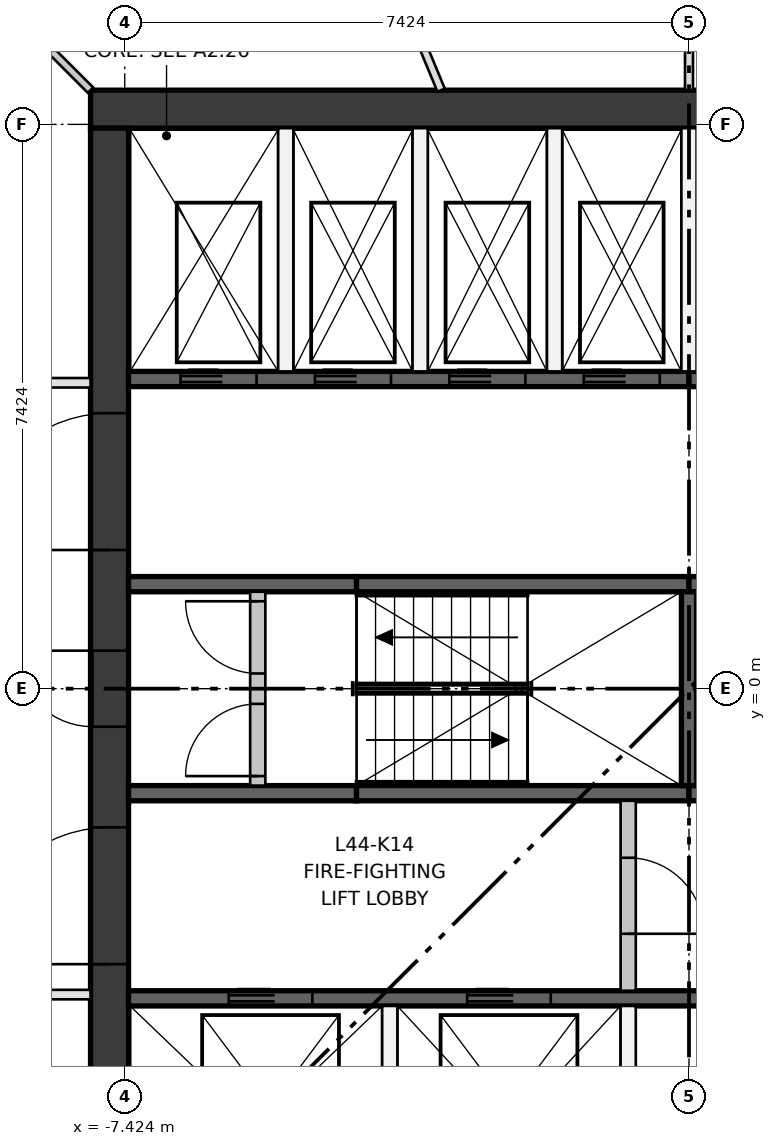
"""IFC4 building model, lengths in metres.
Left out: names, types, materials, properties, quantities, classifications, styles, units other than length and angle.
Written with IfcOpenShell. Run it as: python <this file> out.ifc"""

import sys

from ifc_helpers import new_model, si_unit, direction, frame, frame_2d, origin, place, context, subcontext, project, spatial, rectangle, extrude, element, fill, save


model = new_model("IFC4")
c1 = context("Model", 3, precision=1e-05, world=origin(), true_north=direction((0.0, 1.0)))
c2 = subcontext(c1, "Body", "Model", "MODEL_VIEW")
j1 = project(units=[si_unit("LENGTHUNIT", "METRE"), si_unit("PLANEANGLEUNIT", "RADIAN")], contexts=[c1])
p1 = place(None, origin())
s1 = spatial("IfcSite", under=j1, at=p1, CompositionType="ELEMENT")
p2 = place(p1, origin())
s2 = spatial("IfcBuilding", under=s1, at=p2, CompositionType="ELEMENT")
p3 = place(p2, frame((0.0, 0.0, 167.55)))
s3 = spatial("IfcBuildingStorey", under=s2, at=p3, CompositionType="ELEMENT", Elevation=167.55)
p4 = place(p3, frame((-7.874, 7.624, 0.0), z_axis=(0.0, 0.0, 1.0), x_axis=(1.0, 0.0, 0.0)))
e1 = element("IfcWall", 1, at=p4, inside=s3, PredefinedType="SHEAR", context=c2, shape_type="SweptSolid", body=[
    extrude(rectangle(XDim=15.748, YDim=0.5, at=frame_2d((7.874, 0.0))), origin(), (0.0, 0.0, 1.0), 3.35),
])
p5 = place(p3, frame((-7.624, -7.374, 0.0), z_axis=(0.0, 0.0, 1.0), x_axis=(0.0, 1.0, 0.0)))
e2 = element("IfcWall", 2, at=p5, inside=s3, PredefinedType="SHEAR", context=c2, shape_type="SweptSolid", body=[
    extrude(rectangle(XDim=14.748, YDim=0.5, at=frame_2d((7.374, 0.0))), origin(), (0.0, 0.0, 1.0), 3.35),
])
p6 = place(p5, frame((6.874, 0.0, 0.0)))
e3 = element("IfcOpeningElement", 3, at=p6, cuts=e2, PredefinedType="OPENING", context=c2, shape_type="SweptSolid", body=[
    extrude(rectangle(XDim=1.0, YDim=2.1, at=frame_2d((0.5, 1.05))), frame((0.0, 0.26, 0.0), z_axis=(0.0, -1.0, 0.0), x_axis=(1.0, 0.0, 0.0)), (0.0, 0.0, 1.0), 0.52),
])
p7 = place(p5, frame((3.75, 0.0, 0.0)))
e4 = element("IfcOpeningElement", 4, at=p7, cuts=e2, PredefinedType="OPENING", context=c2, shape_type="SweptSolid", body=[
    extrude(rectangle(XDim=1.8, YDim=2.1, at=frame_2d((0.9, 1.05))), frame((0.0, 0.26, 0.0), z_axis=(0.0, -1.0, 0.0), x_axis=(1.0, 0.0, 0.0)), (0.0, 0.0, 1.0), 0.52),
])
p8 = place(p5, frame((9.198, 0.0, 0.0)))
e5 = element("IfcOpeningElement", 5, at=p8, cuts=e2, PredefinedType="OPENING", context=c2, shape_type="SweptSolid", body=[
    extrude(rectangle(XDim=1.8, YDim=2.1, at=frame_2d((0.9, 1.05))), frame((0.0, 0.26, 0.0), z_axis=(0.0, -1.0, 0.0), x_axis=(1.0, 0.0, 0.0)), (0.0, 0.0, 1.0), 0.52),
])
p9 = place(p3, frame((-7.374, -4.074, 0.0), z_axis=(0.0, 0.0, 1.0), x_axis=(1.0, 0.0, 0.0)))
e6 = element("IfcWall", 6, at=p9, inside=s3, PredefinedType="SHEAR", context=c2, shape_type="SweptSolid", body=[
    extrude(rectangle(XDim=14.748, YDim=0.2, at=frame_2d((7.374, 0.0))), origin(), (0.0, 0.0, 1.0), 3.0),
])
p10 = place(p9, frame((1.319, 0.0, 0.0)))
e7 = element("IfcOpeningElement", 7, at=p10, cuts=e6, PredefinedType="OPENING", context=c2, shape_type="SweptSolid", body=[
    extrude(rectangle(XDim=1.1, YDim=2.1, at=frame_2d((0.55, 1.05))), frame((0.0, 0.11, 0.0), z_axis=(0.0, -1.0, 0.0), x_axis=(1.0, 0.0, 0.0)), (0.0, 0.0, 1.0), 0.22),
])
p11 = place(p9, frame((4.456, 0.0, 0.0)))
e8 = element("IfcOpeningElement", 8, at=p11, cuts=e6, PredefinedType="OPENING", context=c2, shape_type="SweptSolid", body=[
    extrude(rectangle(XDim=1.1, YDim=2.1, at=frame_2d((0.55, 1.05))), frame((0.0, 0.11, 0.0), z_axis=(0.0, -1.0, 0.0), x_axis=(1.0, 0.0, 0.0)), (0.0, 0.0, 1.0), 0.22),
])
p12 = place(p9, frame((7.551, 0.0, 0.0)))
e9 = element("IfcOpeningElement", 9, at=p12, cuts=e6, PredefinedType="OPENING", context=c2, shape_type="SweptSolid", body=[
    extrude(rectangle(XDim=1.0, YDim=2.1, at=frame_2d((0.5, 1.05))), frame((0.0, 0.11, 0.0), z_axis=(0.0, -1.0, 0.0), x_axis=(1.0, 0.0, 0.0)), (0.0, 0.0, 1.0), 0.22),
])
p13 = place(p9, frame((9.914, 0.0, 0.0)))
e10 = element("IfcOpeningElement", 10, at=p13, cuts=e6, PredefinedType="OPENING", context=c2, shape_type="SweptSolid", body=[
    extrude(rectangle(XDim=1.0, YDim=2.1, at=frame_2d((0.5, 1.05))), frame((0.0, 0.11, 0.0), z_axis=(0.0, -1.0, 0.0), x_axis=(1.0, 0.0, 0.0)), (0.0, 0.0, 1.0), 0.22),
])
p14 = place(p9, frame((11.688, 0.0, 0.0)))
e11 = element("IfcOpeningElement", 11, at=p14, cuts=e6, PredefinedType="OPENING", context=c2, shape_type="SweptSolid", body=[
    extrude(rectangle(XDim=1.0, YDim=2.1, at=frame_2d((0.5, 1.05))), frame((0.0, 0.11, 0.0), z_axis=(0.0, -1.0, 0.0), x_axis=(1.0, 0.0, 0.0)), (0.0, 0.0, 1.0), 0.22),
])
p15 = place(p9, frame((13.461, 0.0, 0.0)))
e12 = element("IfcOpeningElement", 12, at=p15, cuts=e6, PredefinedType="OPENING", context=c2, shape_type="SweptSolid", body=[
    extrude(rectangle(XDim=1.0, YDim=2.1, at=frame_2d((0.5, 1.05))), frame((0.0, 0.11, 0.0), z_axis=(0.0, -1.0, 0.0), x_axis=(1.0, 0.0, 0.0)), (0.0, 0.0, 1.0), 0.22),
])
p16 = place(p3, frame((-7.374, 4.074, 0.0), z_axis=(0.0, 0.0, 1.0), x_axis=(1.0, 0.0, 0.0)))
e13 = element("IfcWall", 13, at=p16, inside=s3, PredefinedType="SHEAR", context=c2, shape_type="SweptSolid", body=[
    extrude(rectangle(XDim=7.374, YDim=0.2, at=frame_2d((3.687, 0.0))), origin(), (0.0, 0.0, 1.0), 3.0),
])
p17 = place(p16, frame((0.684, 0.0, 0.0)))
e14 = element("IfcOpeningElement", 14, at=p17, cuts=e13, PredefinedType="OPENING", context=c2, shape_type="SweptSolid", body=[
    extrude(rectangle(XDim=1.0, YDim=2.1, at=frame_2d((0.5, 1.05))), frame((0.0, 0.11, 0.0), z_axis=(0.0, -1.0, 0.0), x_axis=(1.0, 0.0, 0.0)), (0.0, 0.0, 1.0), 0.22),
])
p18 = place(p16, frame((2.453, 0.0, 0.0)))
e15 = element("IfcOpeningElement", 15, at=p18, cuts=e13, PredefinedType="OPENING", context=c2, shape_type="SweptSolid", body=[
    extrude(rectangle(XDim=1.0, YDim=2.1, at=frame_2d((0.5, 1.05))), frame((0.0, 0.11, 0.0), z_axis=(0.0, -1.0, 0.0), x_axis=(1.0, 0.0, 0.0)), (0.0, 0.0, 1.0), 0.22),
])
p19 = place(p16, frame((4.221, 0.0, 0.0)))
e16 = element("IfcOpeningElement", 16, at=p19, cuts=e13, PredefinedType="OPENING", context=c2, shape_type="SweptSolid", body=[
    extrude(rectangle(XDim=1.0, YDim=2.1, at=frame_2d((0.5, 1.05))), frame((0.0, 0.11, 0.0), z_axis=(0.0, -1.0, 0.0), x_axis=(1.0, 0.0, 0.0)), (0.0, 0.0, 1.0), 0.22),
])
p20 = place(p16, frame((5.99, 0.0, 0.0)))
e17 = element("IfcOpeningElement", 17, at=p20, cuts=e13, PredefinedType="OPENING", context=c2, shape_type="SweptSolid", body=[
    extrude(rectangle(XDim=1.0, YDim=2.1, at=frame_2d((0.5, 1.05))), frame((0.0, 0.11, 0.0), z_axis=(0.0, -1.0, 0.0), x_axis=(1.0, 0.0, 0.0)), (0.0, 0.0, 1.0), 0.22),
])
p21 = place(p3, frame((0.0, 4.074, 0.0), z_axis=(0.0, 0.0, 1.0), x_axis=(1.0, 0.0, 0.0)))
e18 = element("IfcWall", 18, at=p21, inside=s3, PredefinedType="SHEAR", context=c2, shape_type="SweptSolid", body=[
    extrude(rectangle(XDim=7.374, YDim=0.2, at=frame_2d((3.687, 0.0))), origin(), (0.0, 0.0, 1.0), 3.0),
])
p22 = place(p21, frame((0.384, 0.0, 0.0)))
e19 = element("IfcOpeningElement", 19, at=p22, cuts=e18, PredefinedType="OPENING", context=c2, shape_type="SweptSolid", body=[
    extrude(rectangle(XDim=1.0, YDim=2.1, at=frame_2d((0.5, 1.05))), frame((0.0, 0.11, 0.0), z_axis=(0.0, -1.0, 0.0), x_axis=(1.0, 0.0, 0.0)), (0.0, 0.0, 1.0), 0.22),
])
p23 = place(p21, frame((2.153, 0.0, 0.0)))
e20 = element("IfcOpeningElement", 20, at=p23, cuts=e18, PredefinedType="OPENING", context=c2, shape_type="SweptSolid", body=[
    extrude(rectangle(XDim=1.0, YDim=2.1, at=frame_2d((0.5, 1.05))), frame((0.0, 0.11, 0.0), z_axis=(0.0, -1.0, 0.0), x_axis=(1.0, 0.0, 0.0)), (0.0, 0.0, 1.0), 0.22),
])
p24 = place(p21, frame((3.921, 0.0, 0.0)))
e21 = element("IfcOpeningElement", 21, at=p24, cuts=e18, PredefinedType="OPENING", context=c2, shape_type="SweptSolid", body=[
    extrude(rectangle(XDim=1.0, YDim=2.1, at=frame_2d((0.5, 1.05))), frame((0.0, 0.11, 0.0), z_axis=(0.0, -1.0, 0.0), x_axis=(1.0, 0.0, 0.0)), (0.0, 0.0, 1.0), 0.22),
])
p25 = place(p21, frame((5.79, 0.0, 0.0)))
e22 = element("IfcOpeningElement", 22, at=p25, cuts=e18, PredefinedType="OPENING", context=c2, shape_type="SweptSolid", body=[
    extrude(rectangle(XDim=0.8, YDim=2.1, at=frame_2d((0.4, 1.05))), frame((0.0, 0.11, 0.0), z_axis=(0.0, -1.0, 0.0), x_axis=(1.0, 0.0, 0.0)), (0.0, 0.0, 1.0), 0.22),
])
p26 = place(p3, frame((-7.374, -1.375, 0.0), z_axis=(0.0, 0.0, 1.0), x_axis=(1.0, 0.0, 0.0)))
e23 = element("IfcWall", 23, at=p26, inside=s3, PredefinedType="SHEAR", context=c2, shape_type="SweptSolid", body=[
    extrude(rectangle(XDim=3.0, YDim=0.2, at=frame_2d((1.5, 0.0))), origin(), (0.0, 0.0, 1.0), 3.0),
])
for number, where, z_axis, x_axis in (
    (24, (-4.374, -1.375, 0.0), (0.0, 0.0, 1.0), (1.0, 0.0, 0.0)),
    (25, (0.0, -1.375, 0.0), (0.0, 0.0, 1.0), (1.0, 0.0, 0.0)),
):
    element("IfcWall", number, at=place(p3, frame(where, z_axis=z_axis, x_axis=x_axis)), inside=s3, PredefinedType="SHEAR", context=c2, shape_type="SweptSolid", body=[
        extrude(rectangle(XDim=4.374, YDim=0.2, at=frame_2d((2.187, 0.0))), origin(), (0.0, 0.0, 1.0), 3.0),
    ])
p27 = place(p3, frame((-7.374, 1.375, 0.0), z_axis=(0.0, 0.0, 1.0), x_axis=(1.0, 0.0, 0.0)))
e26 = element("IfcWall", 26, at=p27, inside=s3, PredefinedType="SHEAR", context=c2, shape_type="SweptSolid", body=[
    extrude(rectangle(XDim=3.0, YDim=0.2, at=frame_2d((1.5, 0.0))), origin(), (0.0, 0.0, 1.0), 3.0),
])
for number, where, z_axis, x_axis in (
    (27, (-4.374, 1.375, 0.0), (0.0, 0.0, 1.0), (1.0, 0.0, 0.0)),
    (28, (0.0, 1.375, 0.0), (0.0, 0.0, 1.0), (1.0, 0.0, 0.0)),
):
    element("IfcWall", number, at=place(p3, frame(where, z_axis=z_axis, x_axis=x_axis)), inside=s3, PredefinedType="SHEAR", context=c2, shape_type="SweptSolid", body=[
        extrude(rectangle(XDim=4.374, YDim=0.2, at=frame_2d((2.187, 0.0))), origin(), (0.0, 0.0, 1.0), 3.0),
    ])
p28 = place(p3, frame((0.0, -1.275, 0.0), z_axis=(0.0, 0.0, 1.0), x_axis=(0.0, 1.0, 0.0)))
e29 = element("IfcWall", 29, at=p28, inside=s3, PredefinedType="SHEAR", context=c2, shape_type="SweptSolid", body=[
    extrude(rectangle(XDim=2.55, YDim=0.2, at=frame_2d((1.275, 0.0))), origin(), (0.0, 0.0, 1.0), 3.0),
])
for number, where, z_axis, x_axis in (
    (30, (-3.937, -7.374, 0.0), (0.0, 0.0, 1.0), (0.0, 1.0, 0.0)),
    (31, (-0.8, -7.374, 0.0), (0.0, 0.0, 1.0), (0.0, 1.0, 0.0)),
):
    element("IfcWall", number, at=place(p3, frame(where, z_axis=z_axis, x_axis=x_axis)), inside=s3, PredefinedType="PARTITIONING", context=c2, shape_type="SweptSolid", body=[
        extrude(rectangle(XDim=3.2, YDim=0.2, at=frame_2d((1.6, 0.0))), origin(), (0.0, 0.0, 1.0), 3.0),
    ])
p29 = place(p3, frame((-0.8, -3.974, 0.0), z_axis=(0.0, 0.0, 1.0), x_axis=(0.0, 1.0, 0.0)))
e32 = element("IfcWall", 32, at=p29, inside=s3, PredefinedType="PARTITIONING", context=c2, shape_type="SweptSolid", body=[
    extrude(rectangle(XDim=2.499, YDim=0.2, at=frame_2d((1.25, 0.0))), origin(), (0.0, 0.0, 1.0), 3.0),
])
p30 = place(p29, frame((0.75, 0.0, 0.0)))
e33 = element("IfcOpeningElement", 33, at=p30, cuts=e32, PredefinedType="OPENING", context=c2, shape_type="SweptSolid", body=[
    extrude(rectangle(XDim=1.0, YDim=2.1, at=frame_2d((0.5, 1.05))), frame((0.0, 0.11, 0.0), z_axis=(0.0, -1.0, 0.0), x_axis=(1.0, 0.0, 0.0)), (0.0, 0.0, 1.0), 0.22),
])
for number, where, z_axis, x_axis in (
    (34, (-5.305, 4.174, 0.0), (0.0, 0.0, 1.0), (0.0, 1.0, 0.0)),
    (35, (-3.537, 4.174, 0.0), (0.0, 0.0, 1.0), (0.0, 1.0, 0.0)),
    (36, (-1.769, 4.174, 0.0), (0.0, 0.0, 1.0), (0.0, 1.0, 0.0)),
    (37, (0.0, 4.174, 0.0), (0.0, 0.0, 1.0), (0.0, 1.0, 0.0)),
):
    element("IfcWall", number, at=place(p3, frame(where, z_axis=z_axis, x_axis=x_axis)), inside=s3, PredefinedType="PARTITIONING", context=c2, shape_type="SweptSolid", body=[
        extrude(rectangle(XDim=3.2, YDim=0.2, at=frame_2d((1.6, 0.0))), origin(), (0.0, 0.0, 1.0), 3.0),
    ])
p31 = place(p3, frame((-5.674, -1.275, 0.0), z_axis=(0.0, 0.0, 1.0), x_axis=(0.0, 1.0, 0.0)))
e38 = element("IfcWall", 38, at=p31, inside=s3, PredefinedType="PARTITIONING", context=c2, shape_type="SweptSolid", body=[
    extrude(rectangle(XDim=2.55, YDim=0.2, at=frame_2d((1.275, 0.0))), origin(), (0.0, 0.0, 1.0), 3.0),
])
p32 = place(p31, frame((0.125, 0.0, 0.0)))
e39 = element("IfcOpeningElement", 39, at=p32, cuts=e38, PredefinedType="OPENING", context=c2, shape_type="SweptSolid", body=[
    extrude(rectangle(XDim=0.95, YDim=2.1, at=frame_2d((0.475, 1.05))), frame((0.0, 0.11, 0.0), z_axis=(0.0, -1.0, 0.0), x_axis=(1.0, 0.0, 0.0)), (0.0, 0.0, 1.0), 0.22),
])
p33 = place(p31, frame((1.475, 0.0, 0.0)))
e40 = element("IfcOpeningElement", 40, at=p33, cuts=e38, PredefinedType="OPENING", context=c2, shape_type="SweptSolid", body=[
    extrude(rectangle(XDim=0.95, YDim=2.1, at=frame_2d((0.475, 1.05))), frame((0.0, 0.11, 0.0), z_axis=(0.0, -1.0, 0.0), x_axis=(1.0, 0.0, 0.0)), (0.0, 0.0, 1.0), 0.22),
])
p34 = place(p3, frame((-12.404, 4.024, 0.0), z_axis=(0.0, 0.0, 1.0), x_axis=(1.0, 0.0, 0.0)))
e41 = element("IfcWall", 41, at=p34, inside=s3, PredefinedType="PARTITIONING", context=c2, shape_type="SweptSolid", body=[
    extrude(rectangle(XDim=4.53, YDim=0.125, at=frame_2d((2.265, 0.0))), origin(), (0.0, 0.0, 1.0), 3.0),
])
p35 = place(p34, frame((1.8, 0.0, 0.0)))
e42 = element("IfcOpeningElement", 42, at=p35, cuts=e41, PredefinedType="OPENING", context=c2, shape_type="SweptSolid", body=[
    extrude(rectangle(XDim=1.0, YDim=2.1, at=frame_2d((0.5, 1.05))), frame((0.0, 0.073, 0.0), z_axis=(0.0, -1.0, 0.0), x_axis=(1.0, 0.0, 0.0)), (0.0, 0.0, 1.0), 0.145),
])
p36 = place(p3, frame((-7.874, -4.024, 0.0), z_axis=(0.0, 0.0, 1.0), x_axis=(-1.0, 0.0, 0.0)))
e43 = element("IfcWall", 43, at=p36, inside=s3, PredefinedType="PARTITIONING", context=c2, shape_type="SweptSolid", body=[
    extrude(rectangle(XDim=4.53, YDim=0.125, at=frame_2d((2.265, 0.0))), origin(), (0.0, 0.0, 1.0), 3.0),
])
p37 = place(p36, frame((1.0, 0.0, 0.0)))
e44 = element("IfcOpeningElement", 44, at=p37, cuts=e43, PredefinedType="OPENING", context=c2, shape_type="SweptSolid", body=[
    extrude(rectangle(XDim=1.8, YDim=2.1, at=frame_2d((0.9, 1.05))), frame((0.0, 0.073, 0.0), z_axis=(0.0, -1.0, 0.0), x_axis=(1.0, 0.0, 0.0)), (0.0, 0.0, 1.0), 0.145),
])
p38 = place(p3, frame((0.0, 7.874, 0.0), z_axis=(0.0, 0.0, 1.0), x_axis=(0.0, 1.0, 0.0)))
e45 = element("IfcWall", 45, at=p38, inside=s3, PredefinedType="PARTITIONING", context=c2, shape_type="SweptSolid", body=[
    extrude(rectangle(XDim=6.52, YDim=0.105, at=frame_2d((3.26, 0.0))), origin(), (0.0, 0.0, 1.0), 3.0),
])
p39 = place(p38, frame((2.8, 0.0, 0.0)))
e46 = element("IfcOpeningElement", 46, at=p39, cuts=e45, PredefinedType="OPENING", context=c2, shape_type="SweptSolid", body=[
    extrude(rectangle(XDim=1.0, YDim=2.1, at=frame_2d((0.5, 1.05))), frame((0.0, 0.062, 0.0), z_axis=(0.0, -1.0, 0.0), x_axis=(1.0, 0.0, 0.0)), (0.0, 0.0, 1.0), 0.125),
])
p40 = place(p3, frame((-3.261, 7.874, 0.0), z_axis=(0.0, 0.0, 1.0), x_axis=(-0.382690105068, 0.923876768559, 0.0)))
e47 = element("IfcWall", 47, at=p40, inside=s3, PredefinedType="PARTITIONING", context=c2, shape_type="SweptSolid", body=[
    extrude(rectangle(XDim=5.927, YDim=0.105, at=frame_2d((2.964, 0.0))), origin(), (0.0, 0.0, 1.0), 3.0),
])
p41 = place(p3, frame((-12.459, 12.459, 0.0), z_axis=(0.0, 0.0, 1.0), x_axis=(0.707106781187, -0.707106781187, 0.0)))
e48 = element("IfcWall", 48, at=p41, inside=s3, PredefinedType="PARTITIONING", context=c2, shape_type="SweptSolid", body=[
    extrude(rectangle(XDim=6.484, YDim=0.1, at=frame_2d((3.242, 0.0))), origin(), (0.0, 0.0, 1.0), 3.0),
])
p42 = place(p41, frame((3.0, 0.0, 0.0)))
e49 = element("IfcOpeningElement", 49, at=p42, cuts=e48, PredefinedType="OPENING", context=c2, shape_type="SweptSolid", body=[
    extrude(rectangle(XDim=1.0, YDim=2.1, at=frame_2d((0.5, 1.05))), frame((0.0, 0.06, 0.0), z_axis=(0.0, -1.0, 0.0), x_axis=(1.0, 0.0, 0.0)), (0.0, 0.0, 1.0), 0.12),
])
p43 = place(p10, origin())
e50 = element("IfcDoor", 50, at=p43, inside=s3, OperationType="DOUBLE_DOOR_SLIDING", PredefinedType="DOOR", context=c2, shape_type="SweptSolid", body=[
    extrude(rectangle(XDim=1.1, YDim=2.1, at=frame_2d((0.55, 1.05))), frame((0.0, 0.025, 0.0), z_axis=(0.0, -1.0, 0.0), x_axis=(1.0, 0.0, 0.0)), (0.0, 0.0, 1.0), 0.05),
])
fill(e7, e50)
p44 = place(p11, origin())
e51 = element("IfcDoor", 51, at=p44, inside=s3, OperationType="DOUBLE_DOOR_SLIDING", PredefinedType="DOOR", context=c2, shape_type="SweptSolid", body=[
    extrude(rectangle(XDim=1.1, YDim=2.1, at=frame_2d((0.55, 1.05))), frame((0.0, 0.025, 0.0), z_axis=(0.0, -1.0, 0.0), x_axis=(1.0, 0.0, 0.0)), (0.0, 0.0, 1.0), 0.05),
])
fill(e8, e51)
p45 = place(p17, frame((1.0, 0.0, 0.0), z_axis=(0.0, 0.0, 1.0), x_axis=(-1.0, 0.0, 0.0)))
e52 = element("IfcDoor", 52, at=p45, inside=s3, OperationType="DOUBLE_DOOR_SLIDING", PredefinedType="DOOR", context=c2, shape_type="SweptSolid", body=[
    extrude(rectangle(XDim=1.0, YDim=2.1, at=frame_2d((0.5, 1.05))), frame((0.0, 0.025, 0.0), z_axis=(0.0, -1.0, 0.0), x_axis=(1.0, 0.0, 0.0)), (0.0, 0.0, 1.0), 0.05),
])
fill(e14, e52)
p46 = place(p18, frame((1.0, 0.0, 0.0), z_axis=(0.0, 0.0, 1.0), x_axis=(-1.0, 0.0, 0.0)))
e53 = element("IfcDoor", 53, at=p46, inside=s3, OperationType="DOUBLE_DOOR_SLIDING", PredefinedType="DOOR", context=c2, shape_type="SweptSolid", body=[
    extrude(rectangle(XDim=1.0, YDim=2.1, at=frame_2d((0.5, 1.05))), frame((0.0, 0.025, 0.0), z_axis=(0.0, -1.0, 0.0), x_axis=(1.0, 0.0, 0.0)), (0.0, 0.0, 1.0), 0.05),
])
fill(e15, e53)
p47 = place(p19, frame((1.0, 0.0, 0.0), z_axis=(0.0, 0.0, 1.0), x_axis=(-1.0, 0.0, 0.0)))
e54 = element("IfcDoor", 54, at=p47, inside=s3, OperationType="DOUBLE_DOOR_SLIDING", PredefinedType="DOOR", context=c2, shape_type="SweptSolid", body=[
    extrude(rectangle(XDim=1.0, YDim=2.1, at=frame_2d((0.5, 1.05))), frame((0.0, 0.025, 0.0), z_axis=(0.0, -1.0, 0.0), x_axis=(1.0, 0.0, 0.0)), (0.0, 0.0, 1.0), 0.05),
])
fill(e16, e54)
p48 = place(p20, frame((1.0, 0.0, 0.0), z_axis=(0.0, 0.0, 1.0), x_axis=(-1.0, 0.0, 0.0)))
e55 = element("IfcDoor", 55, at=p48, inside=s3, OperationType="DOUBLE_DOOR_SLIDING", PredefinedType="DOOR", context=c2, shape_type="SweptSolid", body=[
    extrude(rectangle(XDim=1.0, YDim=2.1, at=frame_2d((0.5, 1.05))), frame((0.0, 0.025, 0.0), z_axis=(0.0, -1.0, 0.0), x_axis=(1.0, 0.0, 0.0)), (0.0, 0.0, 1.0), 0.05),
])
fill(e17, e55)
p49 = place(p32, origin())
e56 = element("IfcDoor", 56, at=p49, inside=s3, OperationType="SINGLE_SWING_LEFT", PredefinedType="DOOR", context=c2, shape_type="SweptSolid", body=[
    extrude(rectangle(XDim=0.95, YDim=2.1, at=frame_2d((0.475, 1.05))), frame((0.0, 0.025, 0.0), z_axis=(0.0, -1.0, 0.0), x_axis=(1.0, 0.0, 0.0)), (0.0, 0.0, 1.0), 0.05),
])
fill(e39, e56)
p50 = place(p33, origin())
e57 = element("IfcDoor", 57, at=p50, inside=s3, OperationType="SINGLE_SWING_RIGHT", PredefinedType="DOOR", context=c2, shape_type="SweptSolid", body=[
    extrude(rectangle(XDim=0.95, YDim=2.1, at=frame_2d((0.475, 1.05))), frame((0.0, 0.025, 0.0), z_axis=(0.0, -1.0, 0.0), x_axis=(1.0, 0.0, 0.0)), (0.0, 0.0, 1.0), 0.05),
])
fill(e40, e57)
p51 = place(p30, frame((1.0, 0.0, 0.0), z_axis=(0.0, 0.0, 1.0), x_axis=(-1.0, 0.0, 0.0)))
e58 = element("IfcDoor", 58, at=p51, inside=s3, OperationType="SINGLE_SWING_LEFT", PredefinedType="DOOR", context=c2, shape_type="SweptSolid", body=[
    extrude(rectangle(XDim=1.0, YDim=2.1, at=frame_2d((0.5, 1.05))), frame((0.0, 0.025, 0.0), z_axis=(0.0, -1.0, 0.0), x_axis=(1.0, 0.0, 0.0)), (0.0, 0.0, 1.0), 0.05),
])
fill(e33, e58)
p52 = place(p6, origin())
e59 = element("IfcDoor", 59, at=p52, inside=s3, OperationType="SINGLE_SWING_RIGHT", PredefinedType="DOOR", context=c2, shape_type="SweptSolid", body=[
    extrude(rectangle(XDim=1.0, YDim=2.1, at=frame_2d((0.5, 1.05))), frame((0.0, 0.25, 0.0), z_axis=(0.0, -1.0, 0.0), x_axis=(1.0, 0.0, 0.0)), (0.0, 0.0, 1.0), 0.05),
])
fill(e3, e59)
p53 = place(p7, origin())
e60 = element("IfcDoor", 60, at=p53, inside=s3, OperationType="DOUBLE_DOOR_SINGLE_SWING", PredefinedType="DOOR", context=c2, shape_type="SweptSolid", body=[
    extrude(rectangle(XDim=1.8, YDim=2.1, at=frame_2d((0.9, 1.05))), frame((0.0, 0.025, 0.0), z_axis=(0.0, -1.0, 0.0), x_axis=(1.0, 0.0, 0.0)), (0.0, 0.0, 1.0), 0.05),
])
fill(e4, e60)
p54 = place(p8, origin())
e61 = element("IfcDoor", 61, at=p54, inside=s3, OperationType="DOUBLE_DOOR_SINGLE_SWING", PredefinedType="DOOR", context=c2, shape_type="SweptSolid", body=[
    extrude(rectangle(XDim=1.8, YDim=2.1, at=frame_2d((0.9, 1.05))), frame((0.0, 0.025, 0.0), z_axis=(0.0, -1.0, 0.0), x_axis=(1.0, 0.0, 0.0)), (0.0, 0.0, 1.0), 0.05),
])
fill(e5, e61)
save(model, sys.argv[1])
